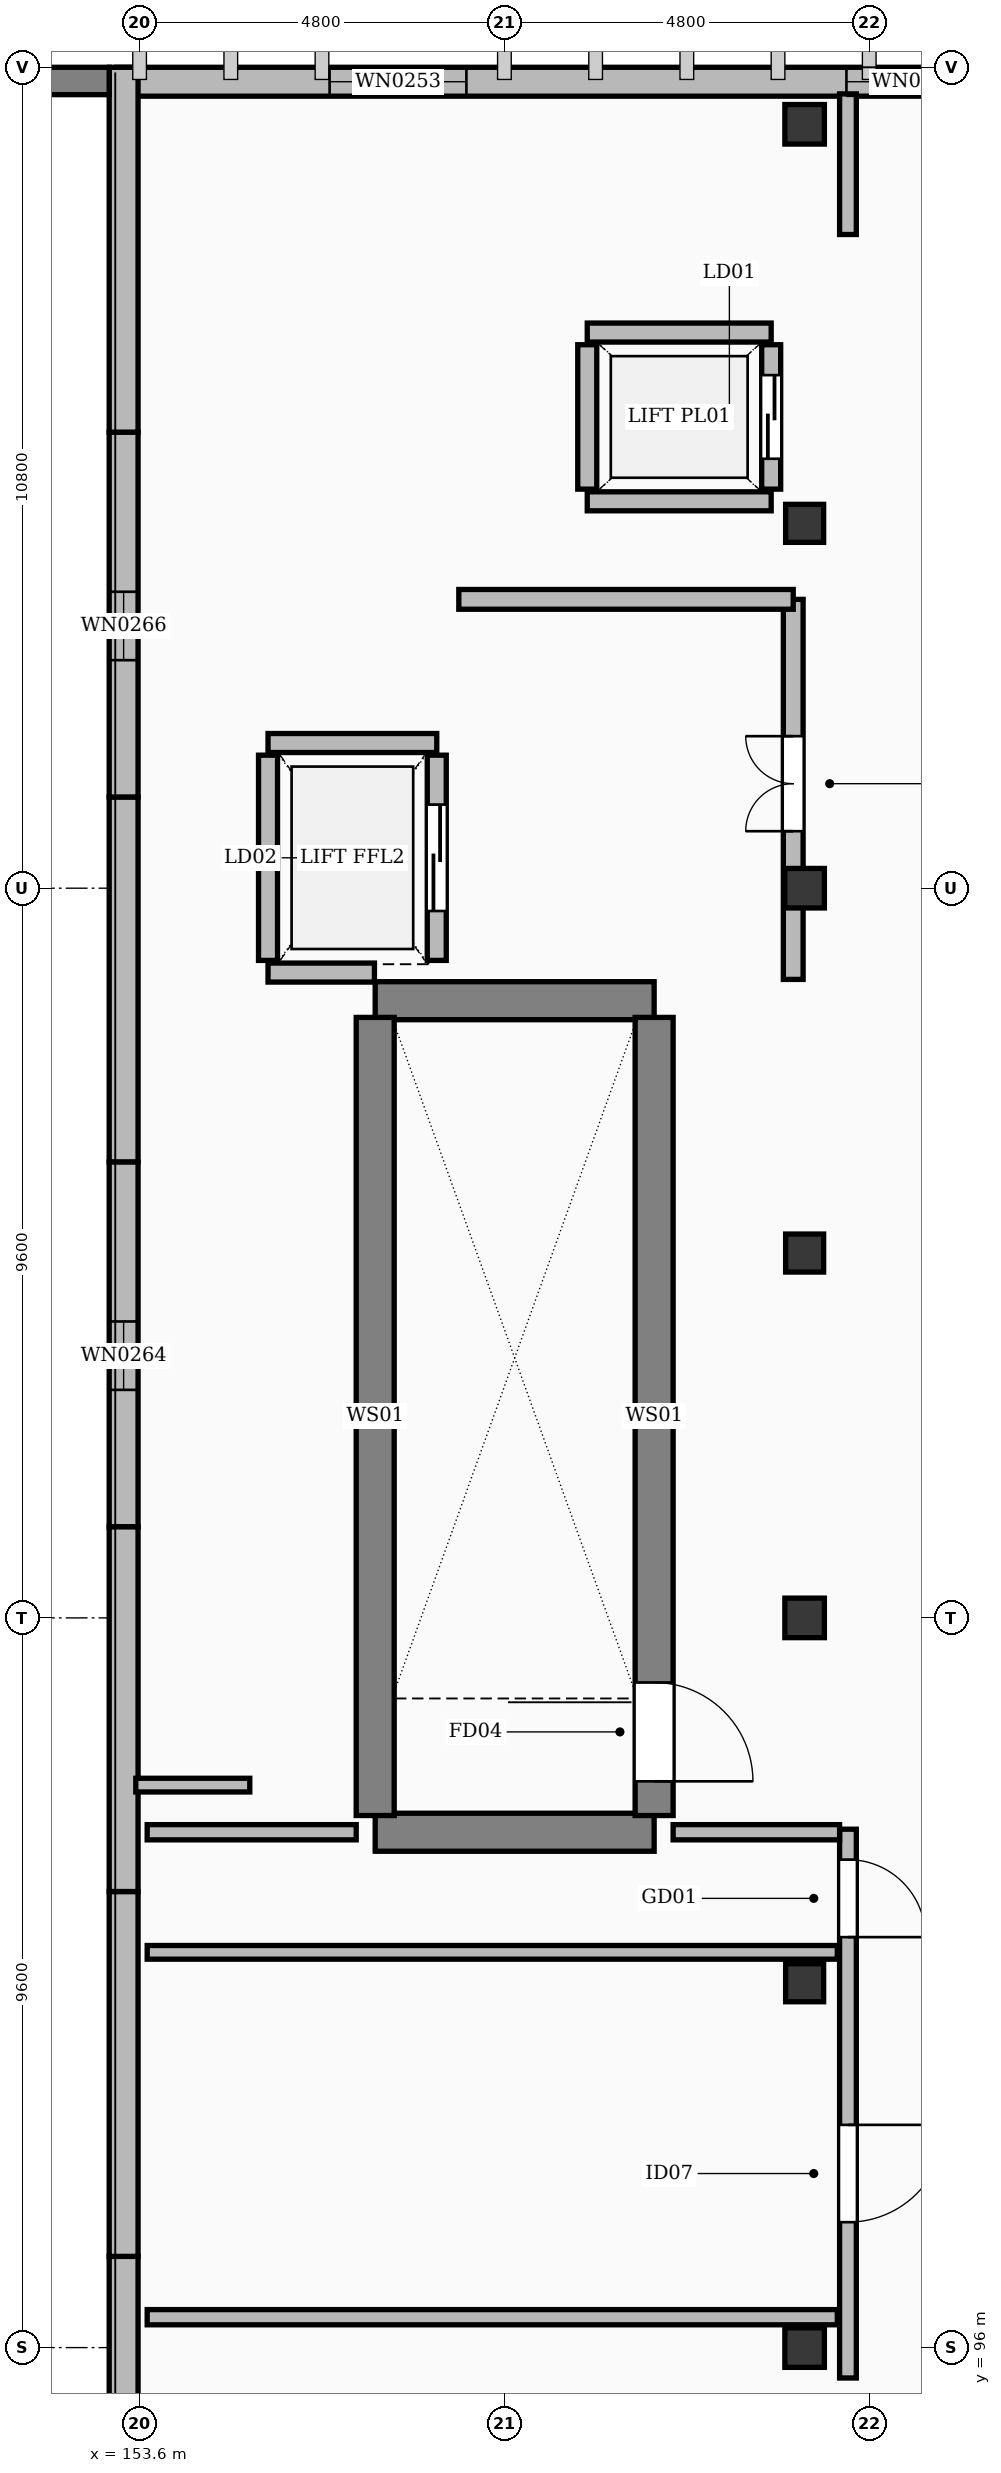
"""IFC4 building model, lengths in metres.
Left out: names, types, materials, properties, quantities, classifications, styles, units other than length and angle.
Written with IfcOpenShell. Run it as: python <this file> out.ifc"""

import sys

from ifc_helpers import new_model, si_unit, direction, frame, frame_2d, origin, origin_2d, place, context, subcontext, project, spatial, polyline, rectangle, outline, extrude, element, fill, save


model = new_model("IFC4")
c1 = context("Model", 3, precision=1e-05, world=origin(), true_north=direction((0.0, 1.0)))
c2 = subcontext(c1, "Body", "Model", "MODEL_VIEW")
j1 = project(units=[si_unit("LENGTHUNIT", "METRE"), si_unit("PLANEANGLEUNIT", "RADIAN")], contexts=[c1])
p1 = place(None, origin())
s1 = spatial("IfcSite", under=j1, at=p1, CompositionType="ELEMENT")
p2 = place(p1, origin())
s2 = spatial("IfcBuilding", under=s1, at=p2, CompositionType="ELEMENT")
p3 = place(p2, frame((0.0, 0.0, 50.4)))
s3 = spatial("IfcBuildingStorey", under=s2, at=p3, CompositionType="ELEMENT", Elevation=50.4)
for number, where, z_axis, x_axis in (
    (1, (162.35, 96.0, 0.0), (0.0, 0.0, 1.0), (1.0, 0.0, 0.0)),
    (2, (162.35, 105.6, 0.0), (0.0, 0.0, 1.0), (1.0, 0.0, 0.0)),
    (3, (162.35, 115.2, 0.0), (0.0, 0.0, 1.0), (1.0, 0.0, 0.0)),
    (4, (162.35, 125.25, 0.0), (0.0, 0.0, 1.0), (1.0, 0.0, 0.0)),
):
    element("IfcColumn", number, at=place(p3, frame(where, z_axis=z_axis, x_axis=x_axis)), inside=s3, PredefinedType="COLUMN", context=c2, shape_type="SweptSolid", body=[
        extrude(rectangle(XDim=0.52, YDim=0.52, at=origin_2d()), origin(), (0.0, 0.0, 1.0), 4.2),
    ])
for number, where, z_axis, x_axis in (
    (5, (162.35, 100.8, 0.0), (0.0, 0.0, 1.0), (1.0, 0.0, 0.0)),
    (6, (162.35, 110.4, 0.0), (0.0, 0.0, 1.0), (1.0, 0.0, 0.0)),
    (7, (162.35, 120.0, 0.0), (0.0, 0.0, 1.0), (1.0, 0.0, 0.0)),
):
    element("IfcColumn", number, at=place(p3, frame(where, z_axis=z_axis, x_axis=x_axis)), inside=s3, PredefinedType="COLUMN", context=c2, shape_type="SweptSolid", body=[
        extrude(rectangle(XDim=0.5, YDim=0.5, at=origin_2d()), origin(), (0.0, 0.0, 1.0), 4.2),
    ])
p4 = place(p3, frame((153.3, 125.81, 0.0), z_axis=(0.0, 0.0, 1.0), x_axis=(1.0, 0.0, 0.0)))
e8 = element("IfcWall", 8, at=p4, inside=s3, PredefinedType="SOLIDWALL", context=c2, shape_type="SweptSolid", body=[
    extrude(rectangle(XDim=22.2, YDim=0.38, at=frame_2d((11.1, 0.0))), origin(), (0.0, 0.0, 1.0), 3.96),
])
p5 = place(p4, frame((2.8, 0.0, 0.55)))
e9 = element("IfcOpeningElement", 9, at=p5, cuts=e8, PredefinedType="OPENING", context=c2, shape_type="SweptSolid", body=[
    extrude(rectangle(XDim=1.8, YDim=1.76, at=frame_2d((0.9, 0.88))), frame((0.0, 0.202, 0.0), z_axis=(0.0, -1.0, 0.0), x_axis=(1.0, 0.0, 0.0)), (0.0, 0.0, 1.0), 0.404),
])
p6 = place(p4, frame((9.6, 0.0, 0.55)))
e10 = element("IfcOpeningElement", 10, at=p6, cuts=e8, PredefinedType="OPENING", context=c2, shape_type="SweptSolid", body=[
    extrude(rectangle(XDim=1.8, YDim=1.76, at=frame_2d((0.9, 0.88))), frame((0.0, 0.202, 0.0), z_axis=(0.0, -1.0, 0.0), x_axis=(1.0, 0.0, 0.0)), (0.0, 0.0, 1.0), 0.404),
])
p7 = place(p4, frame((16.0, 0.0, 0.55)))
e11 = element("IfcOpeningElement", 11, at=p7, cuts=e8, PredefinedType="OPENING", context=c2, shape_type="SweptSolid", body=[
    extrude(rectangle(XDim=1.8, YDim=1.76, at=frame_2d((0.9, 0.88))), frame((0.0, 0.202, 0.0), z_axis=(0.0, -1.0, 0.0), x_axis=(1.0, 0.0, 0.0)), (0.0, 0.0, 1.0), 0.404),
])
for number, where, z_axis, x_axis in (
    (12, (153.39, 92.4, 0.0), (0.0, 0.0, 1.0), (0.0, 1.0, 0.0)),
    (13, (153.39, 97.2, 0.0), (0.0, 0.0, 1.0), (0.0, 1.0, 0.0)),
    (14, (153.39, 102.0, 0.0), (0.0, 0.0, 1.0), (0.0, 1.0, 0.0)),
):
    element("IfcWall", number, at=place(p3, frame(where, z_axis=z_axis, x_axis=x_axis)), inside=s3, PredefinedType="SOLIDWALL", context=c2, shape_type="SweptSolid", body=[
        extrude(rectangle(XDim=4.8, YDim=0.38, at=frame_2d((2.4, 0.0))), origin(), (0.0, 0.0, 1.0), 3.96),
    ])
p8 = place(p3, frame((153.39, 106.8, 0.0), z_axis=(0.0, 0.0, 1.0), x_axis=(0.0, 1.0, 0.0)))
e15 = element("IfcWall", 15, at=p8, inside=s3, PredefinedType="SOLIDWALL", context=c2, shape_type="SweptSolid", body=[
    extrude(rectangle(XDim=4.8, YDim=0.38, at=frame_2d((2.4, 0.0))), origin(), (0.0, 0.0, 1.0), 3.96),
])
p9 = place(p8, frame((1.8, 0.0, 0.35)))
e16 = element("IfcOpeningElement", 16, at=p9, cuts=e15, PredefinedType="OPENING", context=c2, shape_type="SweptSolid", body=[
    extrude(rectangle(XDim=0.9, YDim=1.68, at=frame_2d((0.45, 0.84))), frame((0.0, 0.202, 0.0), z_axis=(0.0, -1.0, 0.0), x_axis=(1.0, 0.0, 0.0)), (0.0, 0.0, 1.0), 0.404),
])
p10 = place(p3, frame((153.39, 111.6, 0.0), z_axis=(0.0, 0.0, 1.0), x_axis=(0.0, 1.0, 0.0)))
e17 = element("IfcWall", 17, at=p10, inside=s3, PredefinedType="SOLIDWALL", context=c2, shape_type="SweptSolid", body=[
    extrude(rectangle(XDim=4.8, YDim=0.38, at=frame_2d((2.4, 0.0))), origin(), (0.0, 0.0, 1.0), 3.96),
])
p11 = place(p3, frame((153.39, 116.4, 0.0), z_axis=(0.0, 0.0, 1.0), x_axis=(0.0, 1.0, 0.0)))
e18 = element("IfcWall", 18, at=p11, inside=s3, PredefinedType="SOLIDWALL", context=c2, shape_type="SweptSolid", body=[
    extrude(rectangle(XDim=4.8, YDim=0.38, at=frame_2d((2.4, 0.0))), origin(), (0.0, 0.0, 1.0), 3.96),
])
p12 = place(p11, frame((1.8, 0.0, 0.35)))
e19 = element("IfcOpeningElement", 19, at=p12, cuts=e18, PredefinedType="OPENING", context=c2, shape_type="SweptSolid", body=[
    extrude(rectangle(XDim=0.9, YDim=1.68, at=frame_2d((0.45, 0.84))), frame((0.0, 0.202, 0.0), z_axis=(0.0, -1.0, 0.0), x_axis=(1.0, 0.0, 0.0)), (0.0, 0.0, 1.0), 0.404),
])
p13 = place(p3, frame((153.39, 121.2, 0.0), z_axis=(0.0, 0.0, 1.0), x_axis=(0.0, 1.0, 0.0)))
e20 = element("IfcWall", 20, at=p13, inside=s3, PredefinedType="SOLIDWALL", context=c2, shape_type="SweptSolid", body=[
    extrude(rectangle(XDim=4.8, YDim=0.38, at=frame_2d((2.4, 0.0))), origin(), (0.0, 0.0, 1.0), 3.96),
])
p14 = place(p3, frame((148.8, 125.82, 0.0), z_axis=(0.0, 0.0, 1.0), x_axis=(1.0, 0.0, 0.0)))
e21 = element("IfcWall", 21, at=p14, inside=s3, PredefinedType="SOLIDWALL", context=c2, shape_type="SweptSolid", body=[
    extrude(outline(polyline([(0.0, 0.0), (4.4, 0.0), (4.4, 3.723), (0.0, 0.05), (0.0, 0.0)])), frame((0.0, 0.18, 0.0), z_axis=(0.0, -1.0, 0.0), x_axis=(1.0, 0.0, 0.0)), (0.0, 0.0, 1.0), 0.36),
])
for number, where, z_axis, x_axis in (
    (22, (156.7, 102.78, 0.0), (0.0, 0.0, 1.0), (1.0, 0.0, 0.0)),
    (23, (156.7, 113.72, 0.0), (0.0, 0.0, 1.0), (1.0, 0.0, 0.0)),
):
    element("IfcWall", number, at=place(p3, frame(where, z_axis=z_axis, x_axis=x_axis)), inside=s3, PredefinedType="SHEAR", context=c2, shape_type="SweptSolid", body=[
        extrude(rectangle(XDim=3.67, YDim=0.5, at=frame_2d((1.835, 0.0))), origin(), (0.0, 0.0, 1.0), 3.96),
    ])
p15 = place(p3, frame((156.7, 103.0, 0.0), z_axis=(0.0, 0.0, 1.0), x_axis=(0.0, 1.0, 0.0)))
e24 = element("IfcWall", 24, at=p15, inside=s3, PredefinedType="SHEAR", context=c2, shape_type="SweptSolid", body=[
    extrude(rectangle(XDim=10.5, YDim=0.5, at=frame_2d((5.25, 0.0))), origin(), (0.0, 0.0, 1.0), 3.96),
])
p16 = place(p3, frame((160.37, 103.0, 0.0), z_axis=(0.0, 0.0, 1.0), x_axis=(0.0, 1.0, 0.0)))
e25 = element("IfcWall", 25, at=p16, inside=s3, PredefinedType="SHEAR", context=c2, shape_type="SweptSolid", body=[
    extrude(rectangle(XDim=10.5, YDim=0.5, at=frame_2d((5.25, 0.0))), origin(), (0.0, 0.0, 1.0), 3.96),
])
p17 = place(p16, frame((0.45, 0.0, 0.0)))
e26 = element("IfcOpeningElement", 26, at=p17, cuts=e25, PredefinedType="OPENING", context=c2, shape_type="SweptSolid", body=[
    extrude(rectangle(XDim=1.3, YDim=2.15, at=frame_2d((0.65, 1.075))), frame((0.0, 0.262, 0.0), z_axis=(0.0, -1.0, 0.0), x_axis=(1.0, 0.0, 0.0)), (0.0, 0.0, 1.0), 0.524),
])
p18 = place(p3, frame((155.29, 114.09, 0.0), z_axis=(0.0, 0.0, 1.0), x_axis=(1.0, 0.0, 0.0)))
e27 = element("IfcWall", 27, at=p18, inside=s3, PredefinedType="SOLIDWALL", context=c2, shape_type="SweptSolid", body=[
    extrude(rectangle(XDim=1.4, YDim=0.25, at=frame_2d((0.7, 0.0))), origin(), (0.0, 0.0, 1.0), 3.96),
])
p19 = place(p3, frame((155.29, 117.11, 0.0), z_axis=(0.0, 0.0, 1.0), x_axis=(1.0, 0.0, 0.0)))
e28 = element("IfcWall", 28, at=p19, inside=s3, PredefinedType="SOLIDWALL", context=c2, shape_type="SweptSolid", body=[
    extrude(rectangle(XDim=2.22, YDim=0.25, at=frame_2d((1.11, 0.0))), origin(), (0.0, 0.0, 1.0), 3.96),
])
p20 = place(p3, frame((155.29, 114.25, 0.0), z_axis=(0.0, 0.0, 1.0), x_axis=(0.0, 1.0, 0.0)))
e29 = element("IfcWall", 29, at=p20, inside=s3, PredefinedType="SOLIDWALL", context=c2, shape_type="SweptSolid", body=[
    extrude(rectangle(XDim=2.7, YDim=0.25, at=frame_2d((1.35, 0.0))), origin(), (0.0, 0.0, 1.0), 3.96),
])
p21 = place(p3, frame((157.51, 114.25, 0.0), z_axis=(0.0, 0.0, 1.0), x_axis=(0.0, 1.0, 0.0)))
e30 = element("IfcWall", 30, at=p21, inside=s3, PredefinedType="SOLIDWALL", context=c2, shape_type="SweptSolid", body=[
    extrude(rectangle(XDim=2.7, YDim=0.25, at=frame_2d((1.35, 0.0))), origin(), (0.0, 0.0, 1.0), 3.96),
])
p22 = place(p21, frame((0.65, 0.0, 0.0)))
e31 = element("IfcOpeningElement", 31, at=p22, cuts=e30, PredefinedType="OPENING", context=c2, shape_type="SweptSolid", body=[
    extrude(rectangle(XDim=1.4, YDim=2.3, at=frame_2d((0.7, 1.15))), frame((0.0, 0.137, 0.0), z_axis=(0.0, -1.0, 0.0), x_axis=(1.0, 0.0, 0.0)), (0.0, 0.0, 1.0), 0.274),
])
for number, where, z_axis, x_axis in (
    (32, (159.49, 120.29, 0.0), (0.0, 0.0, 1.0), (1.0, 0.0, 0.0)),
    (33, (159.49, 122.51, 0.0), (0.0, 0.0, 1.0), (1.0, 0.0, 0.0)),
):
    element("IfcWall", number, at=place(p3, frame(where, z_axis=z_axis, x_axis=x_axis)), inside=s3, PredefinedType="SOLIDWALL", context=c2, shape_type="SweptSolid", body=[
        extrude(rectangle(XDim=2.42, YDim=0.25, at=frame_2d((1.21, 0.0))), origin(), (0.0, 0.0, 1.0), 3.96),
    ])
p23 = place(p3, frame((159.49, 120.45, 0.0), z_axis=(0.0, 0.0, 1.0), x_axis=(0.0, 1.0, 0.0)))
e34 = element("IfcWall", 34, at=p23, inside=s3, PredefinedType="SOLIDWALL", context=c2, shape_type="SweptSolid", body=[
    extrude(rectangle(XDim=1.9, YDim=0.25, at=frame_2d((0.95, 0.0))), origin(), (0.0, 0.0, 1.0), 3.96),
])
p24 = place(p3, frame((161.91, 120.45, 0.0), z_axis=(0.0, 0.0, 1.0), x_axis=(0.0, 1.0, 0.0)))
e35 = element("IfcWall", 35, at=p24, inside=s3, PredefinedType="SOLIDWALL", context=c2, shape_type="SweptSolid", body=[
    extrude(rectangle(XDim=1.9, YDim=0.25, at=frame_2d((0.95, 0.0))), origin(), (0.0, 0.0, 1.0), 3.96),
])
p25 = place(p24, frame((0.4, 0.0, 0.0)))
e36 = element("IfcOpeningElement", 36, at=p25, cuts=e35, PredefinedType="OPENING", context=c2, shape_type="SweptSolid", body=[
    extrude(rectangle(XDim=1.1, YDim=2.2, at=frame_2d((0.55, 1.1))), frame((0.0, 0.137, 0.0), z_axis=(0.0, -1.0, 0.0), x_axis=(1.0, 0.0, 0.0)), (0.0, 0.0, 1.0), 0.274),
])
p26 = place(p3, frame((162.2, 114.0, 0.0), z_axis=(0.0, 0.0, 1.0), x_axis=(0.0, 1.0, 0.0)))
e37 = element("IfcWall", 37, at=p26, inside=s3, PredefinedType="SOLIDWALL", context=c2, shape_type="SweptSolid", body=[
    extrude(rectangle(XDim=5.0, YDim=0.26, at=frame_2d((2.5, 0.0))), origin(), (0.0, 0.0, 1.0), 3.352),
])
p27 = place(p26, frame((1.95, 0.0, 0.0)))
e38 = element("IfcOpeningElement", 38, at=p27, cuts=e37, PredefinedType="OPENING", context=c2, shape_type="SweptSolid", body=[
    extrude(rectangle(XDim=1.25, YDim=2.15, at=frame_2d((0.625, 1.075))), frame((0.0, 0.142, 0.0), z_axis=(0.0, -1.0, 0.0), x_axis=(1.0, 0.0, 0.0)), (0.0, 0.0, 1.0), 0.284),
])
p28 = place(p3, frame((157.8, 119.0, 0.0), z_axis=(0.0, 0.0, 1.0), x_axis=(1.0, 0.0, 0.0)))
e39 = element("IfcWall", 39, at=p28, inside=s3, PredefinedType="SOLIDWALL", context=c2, shape_type="SweptSolid", body=[
    extrude(rectangle(XDim=4.4, YDim=0.26, at=frame_2d((2.2, 0.0))), origin(), (0.0, 0.0, 1.0), 3.352),
])
p29 = place(p3, frame((162.92, 95.6, 0.0), z_axis=(0.0, 0.0, 1.0), x_axis=(0.0, 1.0, 0.0)))
e40 = element("IfcWall", 40, at=p29, inside=s3, PredefinedType="PARTITIONING", context=c2, shape_type="SweptSolid", body=[
    extrude(rectangle(XDim=7.22, YDim=0.22, at=frame_2d((3.61, 0.0))), origin(), (0.0, 0.0, 1.0), 3.352),
])
p30 = place(p29, frame((2.05, 0.0, 0.0)))
e41 = element("IfcOpeningElement", 41, at=p30, cuts=e40, PredefinedType="OPENING", context=c2, shape_type="SweptSolid", body=[
    extrude(rectangle(XDim=1.28, YDim=2.16, at=frame_2d((0.64, 1.08))), frame((0.0, 0.122, 0.0), z_axis=(0.0, -1.0, 0.0), x_axis=(1.0, 0.0, 0.0)), (0.0, 0.0, 1.0), 0.244),
])
p31 = place(p29, frame((5.8, 0.0, 0.0)))
e42 = element("IfcOpeningElement", 42, at=p31, cuts=e40, PredefinedType="OPENING", context=c2, shape_type="SweptSolid", body=[
    extrude(rectangle(XDim=1.02, YDim=2.2, at=frame_2d((0.51, 1.1))), frame((0.0, 0.122, 0.0), z_axis=(0.0, -1.0, 0.0), x_axis=(1.0, 0.0, 0.0)), (0.0, 0.0, 1.0), 0.244),
])
p32 = place(p3, frame((162.92, 123.8, 0.0), z_axis=(0.0, 0.0, 1.0), x_axis=(0.0, 1.0, 0.0)))
e43 = element("IfcWall", 43, at=p32, inside=s3, PredefinedType="PARTITIONING", context=c2, shape_type="SweptSolid", body=[
    extrude(rectangle(XDim=1.85, YDim=0.22, at=frame_2d((0.925, 0.0))), origin(), (0.0, 0.0, 1.0), 3.202),
])
p33 = place(p3, frame((153.7, 96.4, 0.0), z_axis=(0.0, 0.0, 1.0), x_axis=(1.0, 0.0, 0.0)))
e44 = element("IfcWall", 44, at=p33, inside=s3, PredefinedType="PARTITIONING", context=c2, shape_type="SweptSolid", body=[
    extrude(rectangle(XDim=9.08, YDim=0.2, at=frame_2d((4.54, 0.0))), origin(), (0.0, 0.0, 1.0), 3.352),
])
p34 = place(p3, frame((153.7, 101.2, 0.0), z_axis=(0.0, 0.0, 1.0), x_axis=(1.0, 0.0, 0.0)))
e45 = element("IfcWall", 45, at=p34, inside=s3, PredefinedType="PARTITIONING", context=c2, shape_type="SweptSolid", body=[
    extrude(rectangle(XDim=9.08, YDim=0.18, at=frame_2d((4.54, 0.0))), origin(), (0.0, 0.0, 1.0), 3.352),
])
p35 = place(p3, frame((153.7, 102.78, 0.0), z_axis=(0.0, 0.0, 1.0), x_axis=(1.0, 0.0, 0.0)))
e46 = element("IfcWall", 46, at=p35, inside=s3, PredefinedType="PARTITIONING", context=c2, shape_type="SweptSolid", body=[
    extrude(rectangle(XDim=2.75, YDim=0.2, at=frame_2d((1.375, 0.0))), origin(), (0.0, 0.0, 1.0), 3.96),
])
p36 = place(p3, frame((160.62, 102.78, 0.0), z_axis=(0.0, 0.0, 1.0), x_axis=(1.0, 0.0, 0.0)))
e47 = element("IfcWall", 47, at=p36, inside=s3, PredefinedType="PARTITIONING", context=c2, shape_type="SweptSolid", body=[
    extrude(rectangle(XDim=2.19, YDim=0.2, at=frame_2d((1.095, 0.0))), origin(), (0.0, 0.0, 1.0), 3.352),
])
p37 = place(p3, frame((153.55, 103.4, 0.0), z_axis=(0.0, 0.0, 1.0), x_axis=(1.0, 0.0, 0.0)))
e48 = element("IfcWall", 48, at=p37, inside=s3, PredefinedType="PARTITIONING", context=c2, shape_type="SweptSolid", body=[
    extrude(rectangle(XDim=1.5, YDim=0.18, at=frame_2d((0.75, 0.0))), origin(), (0.0, 0.0, 1.0), 3.96),
])
p38 = place(p5, origin())
e49 = element("IfcWindow", 49, at=p38, inside=s3, PartitioningType="SINGLE_PANEL", PredefinedType="WINDOW", context=c2, shape_type="SweptSolid", body=[
    extrude(rectangle(XDim=1.8, YDim=1.76, at=frame_2d((0.9, 0.88))), frame((0.0, 0.03, 0.0), z_axis=(0.0, -1.0, 0.0), x_axis=(1.0, 0.0, 0.0)), (0.0, 0.0, 1.0), 0.06),
])
fill(e9, e49)
p39 = place(p6, origin())
e50 = element("IfcWindow", 50, at=p39, inside=s3, PartitioningType="SINGLE_PANEL", PredefinedType="WINDOW", context=c2, shape_type="SweptSolid", body=[
    extrude(rectangle(XDim=1.8, YDim=1.76, at=frame_2d((0.9, 0.88))), frame((0.0, 0.03, 0.0), z_axis=(0.0, -1.0, 0.0), x_axis=(1.0, 0.0, 0.0)), (0.0, 0.0, 1.0), 0.06),
])
fill(e10, e50)
p40 = place(p9, origin())
e51 = element("IfcWindow", 51, at=p40, inside=s3, PartitioningType="SINGLE_PANEL", PredefinedType="WINDOW", context=c2, shape_type="SweptSolid", body=[
    extrude(rectangle(XDim=0.9, YDim=1.68, at=frame_2d((0.45, 0.84))), frame((0.0, 0.03, 0.0), z_axis=(0.0, -1.0, 0.0), x_axis=(1.0, 0.0, 0.0)), (0.0, 0.0, 1.0), 0.06),
])
fill(e16, e51)
p41 = place(p12, origin())
e52 = element("IfcWindow", 52, at=p41, inside=s3, PartitioningType="SINGLE_PANEL", PredefinedType="WINDOW", context=c2, shape_type="SweptSolid", body=[
    extrude(rectangle(XDim=0.9, YDim=1.68, at=frame_2d((0.45, 0.84))), frame((0.0, 0.03, 0.0), z_axis=(0.0, -1.0, 0.0), x_axis=(1.0, 0.0, 0.0)), (0.0, 0.0, 1.0), 0.06),
])
fill(e19, e52)
p42 = place(p17, frame((1.3, 0.0, 0.0), z_axis=(0.0, 0.0, 1.0), x_axis=(-1.0, 0.0, 0.0)))
e53 = element("IfcDoor", 53, at=p42, inside=s3, OperationType="SINGLE_SWING_LEFT", PredefinedType="DOOR", context=c2, shape_type="SweptSolid", body=[
    extrude(rectangle(XDim=1.3, YDim=2.15, at=frame_2d((0.65, 1.075))), frame((0.0, 0.025, 0.0), z_axis=(0.0, -1.0, 0.0), x_axis=(1.0, 0.0, 0.0)), (0.0, 0.0, 1.0), 0.05),
])
fill(e26, e53)
p43 = place(p22, origin())
e54 = element("IfcDoor", 54, at=p43, inside=s3, OperationType="SLIDING_TO_LEFT", PredefinedType="DOOR", context=c2, shape_type="SweptSolid", body=[
    extrude(rectangle(XDim=1.4, YDim=2.3, at=frame_2d((0.7, 1.15))), frame((0.0, 0.025, 0.0), z_axis=(0.0, -1.0, 0.0), x_axis=(1.0, 0.0, 0.0)), (0.0, 0.0, 1.0), 0.05),
])
fill(e31, e54)
p44 = place(p25, origin())
e55 = element("IfcDoor", 55, at=p44, inside=s3, OperationType="SLIDING_TO_LEFT", PredefinedType="DOOR", context=c2, shape_type="SweptSolid", body=[
    extrude(rectangle(XDim=1.1, YDim=2.2, at=frame_2d((0.55, 1.1))), frame((0.0, 0.025, 0.0), z_axis=(0.0, -1.0, 0.0), x_axis=(1.0, 0.0, 0.0)), (0.0, 0.0, 1.0), 0.05),
])
fill(e36, e55)
p45 = place(p27, origin())
e56 = element("IfcDoor", 56, at=p45, inside=s3, OperationType="DOUBLE_DOOR_SINGLE_SWING", PredefinedType="DOOR", context=c2, shape_type="SweptSolid", body=[
    extrude(rectangle(XDim=1.25, YDim=2.15, at=frame_2d((0.625, 1.075))), frame((0.0, 0.025, 0.0), z_axis=(0.0, -1.0, 0.0), x_axis=(1.0, 0.0, 0.0)), (0.0, 0.0, 1.0), 0.05),
])
fill(e38, e56)
p46 = place(p30, frame((1.28, 0.0, 0.0), z_axis=(0.0, 0.0, 1.0), x_axis=(-1.0, 0.0, 0.0)))
e57 = element("IfcDoor", 57, at=p46, inside=s3, OperationType="SINGLE_SWING_RIGHT", PredefinedType="DOOR", context=c2, shape_type="SweptSolid", body=[
    extrude(rectangle(XDim=1.28, YDim=2.16, at=frame_2d((0.64, 1.08))), frame((0.0, 0.025, 0.0), z_axis=(0.0, -1.0, 0.0), x_axis=(1.0, 0.0, 0.0)), (0.0, 0.0, 1.0), 0.05),
])
fill(e41, e57)
p47 = place(p31, frame((1.02, 0.0, 0.0), z_axis=(0.0, 0.0, 1.0), x_axis=(-1.0, 0.0, 0.0)))
e58 = element("IfcDoor", 58, at=p47, inside=s3, OperationType="SINGLE_SWING_LEFT", PredefinedType="DOOR", context=c2, shape_type="SweptSolid", body=[
    extrude(rectangle(XDim=1.02, YDim=2.2, at=frame_2d((0.51, 1.1))), frame((0.0, 0.025, 0.0), z_axis=(0.0, -1.0, 0.0), x_axis=(1.0, 0.0, 0.0)), (0.0, 0.0, 1.0), 0.05),
])
fill(e42, e58)
save(model, sys.argv[1])
